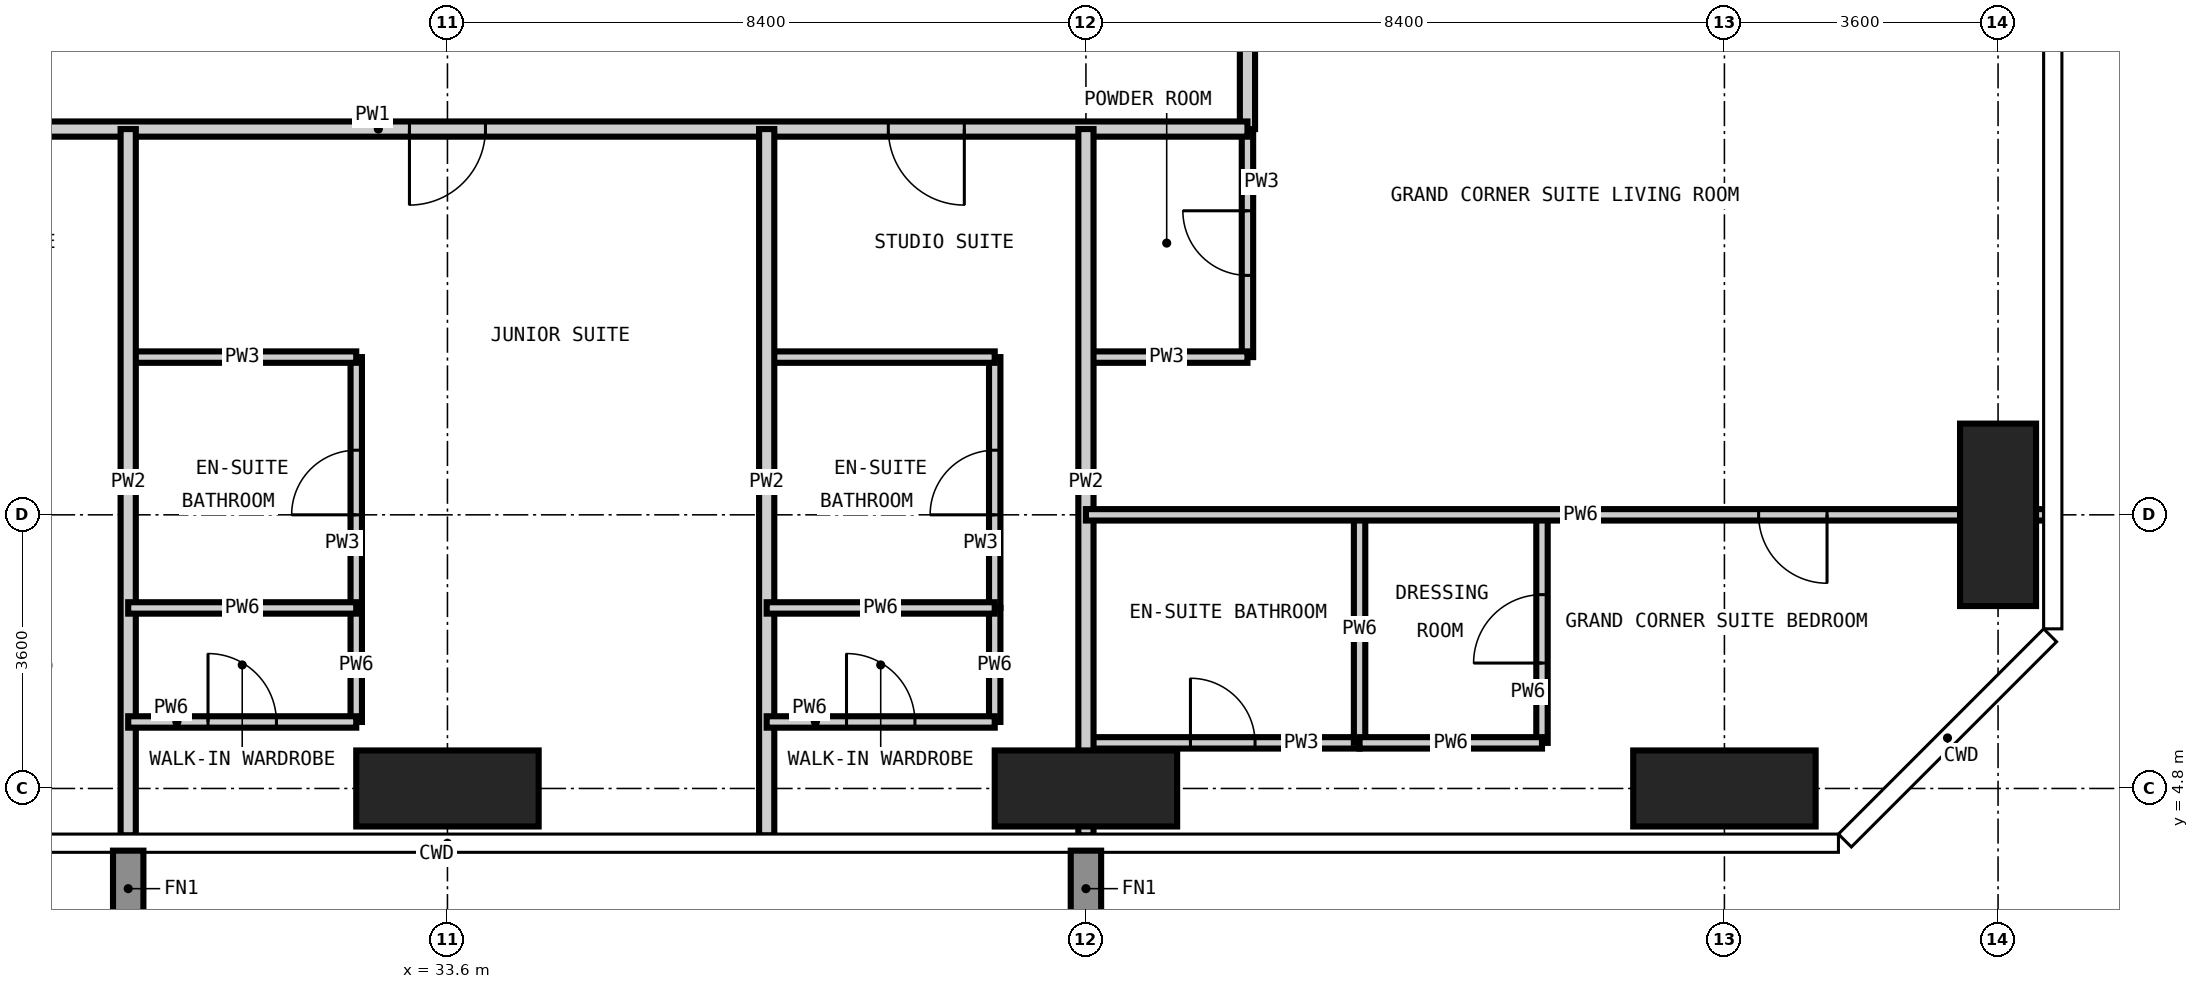
"""IFC4 building model, lengths in metres.
Left out: names, types, materials, properties, quantities, classifications, styles, units other than length and angle.
Written with IfcOpenShell. Run it as: python <this file> out.ifc"""

import sys

from ifc_helpers import new_model, si_unit, direction, frame, frame_2d, origin, origin_2d, place, context, subcontext, project, spatial, rectangle, extrude, element, fill, save


model = new_model("IFC4")
c1 = context("Model", 3, precision=1e-05, world=origin(), true_north=direction((0.0, 1.0)))
c2 = subcontext(c1, "Body", "Model", "MODEL_VIEW")
j1 = project(units=[si_unit("LENGTHUNIT", "METRE"), si_unit("PLANEANGLEUNIT", "RADIAN")], contexts=[c1])
p1 = place(None, origin())
s1 = spatial("IfcSite", under=j1, at=p1, CompositionType="ELEMENT")
p2 = place(p1, origin())
s2 = spatial("IfcBuilding", under=s1, at=p2, CompositionType="ELEMENT")
p3 = place(p2, frame((0.0, 0.0, 241.2)))
s3 = spatial("IfcBuildingStorey", under=s2, at=p3, CompositionType="ELEMENT", Elevation=241.2)
for number, where, z_axis, x_axis in (
    (1, (33.6, 4.8, -0.35), (0.0, 0.0, 1.0), (1.0, 0.0, 0.0)),
    (2, (42.0, 4.8, -0.35), (0.0, 0.0, 1.0), (1.0, 0.0, 0.0)),
    (3, (50.4, 4.8, -0.35), (0.0, 0.0, 1.0), (1.0, 0.0, 0.0)),
):
    element("IfcColumn", number, at=place(p3, frame(where, z_axis=z_axis, x_axis=x_axis)), inside=s3, PredefinedType="COLUMN", context=c2, shape_type="SweptSolid", body=[
        extrude(rectangle(XDim=2.4, YDim=1.0, at=origin_2d()), origin(), (0.0, 0.0, 1.0), 3.9),
    ])
p4 = place(p3, frame((54.0, 8.4, -0.35), z_axis=(0.0, 0.0, 1.0), x_axis=(1.0, 0.0, 0.0)))
e4 = element("IfcColumn", 4, at=p4, inside=s3, PredefinedType="COLUMN", context=c2, shape_type="SweptSolid", body=[
    extrude(rectangle(XDim=1.0, YDim=2.4, at=origin_2d()), origin(), (0.0, 0.0, 1.0), 3.9),
])
p5 = place(p3, frame((32.4, 7.175, 0.0), z_axis=(0.0, 0.0, 1.0), x_axis=(0.0, 1.0, 0.0)))
e5 = element("IfcWall", 5, at=p5, inside=s3, PredefinedType="PARTITIONING", context=c2, shape_type="SweptSolid", body=[
    extrude(rectangle(XDim=3.3, YDim=0.15, at=frame_2d((1.65, 0.0))), origin(), (0.0, 0.0, 1.0), 3.55),
])
p6 = place(p5, frame((1.225, 0.0, 0.0)))
e6 = element("IfcOpeningElement", 6, at=p6, cuts=e5, PredefinedType="OPENING", context=c2, shape_type="SweptSolid", body=[
    extrude(rectangle(XDim=0.85, YDim=2.1, at=frame_2d((0.425, 1.05))), frame((0.0, 0.085, 0.0), z_axis=(0.0, -1.0, 0.0), x_axis=(1.0, 0.0, 0.0)), (0.0, 0.0, 1.0), 0.17),
])
p7 = place(p3, frame((40.8, 7.175, 0.0), z_axis=(0.0, 0.0, 1.0), x_axis=(0.0, 1.0, 0.0)))
e7 = element("IfcWall", 7, at=p7, inside=s3, PredefinedType="PARTITIONING", context=c2, shape_type="SweptSolid", body=[
    extrude(rectangle(XDim=3.3, YDim=0.15, at=frame_2d((1.65, 0.0))), origin(), (0.0, 0.0, 1.0), 3.55),
])
p8 = place(p7, frame((1.225, 0.0, 0.0)))
e8 = element("IfcOpeningElement", 8, at=p8, cuts=e7, PredefinedType="OPENING", context=c2, shape_type="SweptSolid", body=[
    extrude(rectangle(XDim=0.85, YDim=2.1, at=frame_2d((0.425, 1.05))), frame((0.0, 0.085, 0.0), z_axis=(0.0, -1.0, 0.0), x_axis=(1.0, 0.0, 0.0)), (0.0, 0.0, 1.0), 0.17),
])
p9 = place(p3, frame((44.125, 10.475, 0.0), z_axis=(0.0, 0.0, 1.0), x_axis=(0.0, 1.0, 0.0)))
e9 = element("IfcWall", 9, at=p9, inside=s3, PredefinedType="PARTITIONING", context=c2, shape_type="SweptSolid", body=[
    extrude(rectangle(XDim=3.0, YDim=0.15, at=frame_2d((1.5, 0.0))), origin(), (0.0, 0.0, 1.0), 3.55),
])
p10 = place(p9, frame((1.075, 0.0, 0.0)))
e10 = element("IfcOpeningElement", 10, at=p10, cuts=e9, PredefinedType="OPENING", context=c2, shape_type="SweptSolid", body=[
    extrude(rectangle(XDim=0.85, YDim=2.1, at=frame_2d((0.425, 1.05))), frame((0.0, 0.085, 0.0), z_axis=(0.0, -1.0, 0.0), x_axis=(1.0, 0.0, 0.0)), (0.0, 0.0, 1.0), 0.17),
])
p11 = place(p3, frame((42.0, 5.4, 0.0), z_axis=(0.0, 0.0, 1.0), x_axis=(1.0, 0.0, 0.0)))
e11 = element("IfcWall", 11, at=p11, inside=s3, PredefinedType="PARTITIONING", context=c2, shape_type="SweptSolid", body=[
    extrude(rectangle(XDim=3.6, YDim=0.15, at=frame_2d((1.8, 0.0))), origin(), (0.0, 0.0, 1.0), 3.55),
])
p12 = place(p11, frame((1.375, 0.0, 0.0)))
e12 = element("IfcOpeningElement", 12, at=p12, cuts=e11, PredefinedType="OPENING", context=c2, shape_type="SweptSolid", body=[
    extrude(rectangle(XDim=0.85, YDim=2.1, at=frame_2d((0.425, 1.05))), frame((0.0, 0.085, 0.0), z_axis=(0.0, -1.0, 0.0), x_axis=(1.0, 0.0, 0.0)), (0.0, 0.0, 1.0), 0.17),
])
for number, where, z_axis, x_axis in (
    (13, (29.4, 10.475, 0.0), (0.0, 0.0, 1.0), (1.0, 0.0, 0.0)),
    (14, (37.8, 10.475, 0.0), (0.0, 0.0, 1.0), (1.0, 0.0, 0.0)),
):
    element("IfcWall", number, at=place(p3, frame(where, z_axis=z_axis, x_axis=x_axis)), inside=s3, PredefinedType="PARTITIONING", context=c2, shape_type="SweptSolid", body=[
        extrude(rectangle(XDim=3.0, YDim=0.15, at=frame_2d((1.5, 0.0))), origin(), (0.0, 0.0, 1.0), 3.55),
    ])
p13 = place(p3, frame((42.0, 10.475, 0.0), z_axis=(0.0, 0.0, 1.0), x_axis=(1.0, 0.0, 0.0)))
e15 = element("IfcWall", 15, at=p13, inside=s3, PredefinedType="PARTITIONING", context=c2, shape_type="SweptSolid", body=[
    extrude(rectangle(XDim=2.125, YDim=0.15, at=frame_2d((1.062, 0.0))), origin(), (0.0, 0.0, 1.0), 3.55),
])
p14 = place(p3, frame((44.125, 25.2, 0.0), z_axis=(0.0, 0.0, 1.0), x_axis=(0.0, -1.0, 0.0)))
e16 = element("IfcWall", 16, at=p14, inside=s3, PredefinedType="PARTITIONING", context=c2, shape_type="SweptSolid", body=[
    extrude(rectangle(XDim=11.725, YDim=0.2, at=frame_2d((5.862, 0.0))), origin(), (0.0, 0.0, 1.0), 3.55),
])
p15 = place(p14, frame((3.7, 0.0, 0.0)))
e17 = element("IfcOpeningElement", 17, at=p15, cuts=e16, PredefinedType="OPENING", context=c2, shape_type="SweptSolid", body=[
    extrude(rectangle(XDim=1.0, YDim=2.2, at=frame_2d((0.5, 1.1))), frame((0.0, 0.11, 0.0), z_axis=(0.0, -1.0, 0.0), x_axis=(1.0, 0.0, 0.0)), (0.0, 0.0, 1.0), 0.22),
])
p16 = place(p14, frame((9.563, 0.0, 0.0)))
e18 = element("IfcOpeningElement", 18, at=p16, cuts=e16, PredefinedType="OPENING", context=c2, shape_type="SweptSolid", body=[
    extrude(rectangle(XDim=1.0, YDim=2.2, at=frame_2d((0.5, 1.1))), frame((0.0, 0.11, 0.0), z_axis=(0.0, -1.0, 0.0), x_axis=(1.0, 0.0, 0.0)), (0.0, 0.0, 1.0), 0.22),
])
p17 = place(p3, frame((44.125, 13.475, 0.0), z_axis=(0.0, 0.0, 1.0), x_axis=(-1.0, 0.0, 0.0)))
e19 = element("IfcWall", 19, at=p17, inside=s3, PredefinedType="PARTITIONING", context=c2, shape_type="SweptSolid", body=[
    extrude(rectangle(XDim=22.25, YDim=0.2, at=frame_2d((11.125, 0.0))), origin(), (0.0, 0.0, 1.0), 3.55),
])
p18 = place(p17, frame((16.325, 0.0, 0.0)))
e20 = element("IfcOpeningElement", 20, at=p18, cuts=e19, PredefinedType="OPENING", context=c2, shape_type="SweptSolid", body=[
    extrude(rectangle(XDim=1.0, YDim=2.2, at=frame_2d((0.5, 1.1))), frame((0.0, 0.11, 0.0), z_axis=(0.0, -1.0, 0.0), x_axis=(1.0, 0.0, 0.0)), (0.0, 0.0, 1.0), 0.22),
])
p19 = place(p17, frame((10.025, 0.0, 0.0)))
e21 = element("IfcOpeningElement", 21, at=p19, cuts=e19, PredefinedType="OPENING", context=c2, shape_type="SweptSolid", body=[
    extrude(rectangle(XDim=1.0, YDim=2.2, at=frame_2d((0.5, 1.1))), frame((0.0, 0.11, 0.0), z_axis=(0.0, -1.0, 0.0), x_axis=(1.0, 0.0, 0.0)), (0.0, 0.0, 1.0), 0.22),
])
p20 = place(p17, frame((3.725, 0.0, 0.0)))
e22 = element("IfcOpeningElement", 22, at=p20, cuts=e19, PredefinedType="OPENING", context=c2, shape_type="SweptSolid", body=[
    extrude(rectangle(XDim=1.0, YDim=2.2, at=frame_2d((0.5, 1.1))), frame((0.0, 0.11, 0.0), z_axis=(0.0, -1.0, 0.0), x_axis=(1.0, 0.0, 0.0)), (0.0, 0.0, 1.0), 0.22),
])
for number, where, z_axis, x_axis in (
    (23, (29.4, 4.182, 0.0), (0.0, 0.0, 1.0), (0.0, 1.0, 0.0)),
    (24, (37.8, 4.182, 0.0), (0.0, 0.0, 1.0), (0.0, 1.0, 0.0)),
    (25, (42.0, 4.182, 0.0), (0.0, 0.0, 1.0), (0.0, 1.0, 0.0)),
):
    element("IfcWall", number, at=place(p3, frame(where, z_axis=z_axis, x_axis=x_axis)), inside=s3, PredefinedType="PARTITIONING", context=c2, shape_type="SweptSolid", body=[
        extrude(rectangle(XDim=9.293, YDim=0.2, at=frame_2d((4.646, 0.0))), origin(), (0.0, 0.0, 1.0), 3.55),
    ])
for number, where, z_axis, x_axis in (
    (26, (32.4, 5.675, 0.0), (0.0, 0.0, 1.0), (0.0, 1.0, 0.0)),
    (27, (40.8, 5.675, 0.0), (0.0, 0.0, 1.0), (0.0, 1.0, 0.0)),
):
    element("IfcWall", number, at=place(p3, frame(where, z_axis=z_axis, x_axis=x_axis)), inside=s3, PredefinedType="PARTITIONING", context=c2, shape_type="SweptSolid", body=[
        extrude(rectangle(XDim=1.5, YDim=0.15, at=frame_2d((0.75, 0.0))), origin(), (0.0, 0.0, 1.0), 3.55),
    ])
p21 = place(p3, frame((45.6, 5.4, 0.0), z_axis=(0.0, 0.0, 1.0), x_axis=(0.0, 1.0, 0.0)))
e28 = element("IfcWall", 28, at=p21, inside=s3, PredefinedType="PARTITIONING", context=c2, shape_type="SweptSolid", body=[
    extrude(rectangle(XDim=3.0, YDim=0.15, at=frame_2d((1.5, 0.0))), origin(), (0.0, 0.0, 1.0), 3.55),
])
p22 = place(p3, frame((48.0, 5.4, 0.0), z_axis=(0.0, 0.0, 1.0), x_axis=(0.0, 1.0, 0.0)))
e29 = element("IfcWall", 29, at=p22, inside=s3, PredefinedType="PARTITIONING", context=c2, shape_type="SweptSolid", body=[
    extrude(rectangle(XDim=3.0, YDim=0.15, at=frame_2d((1.5, 0.0))), origin(), (0.0, 0.0, 1.0), 3.55),
])
p23 = place(p22, frame((1.05, 0.0, 0.0)))
e30 = element("IfcOpeningElement", 30, at=p23, cuts=e29, PredefinedType="OPENING", context=c2, shape_type="SweptSolid", body=[
    extrude(rectangle(XDim=0.9, YDim=2.1, at=frame_2d((0.45, 1.05))), frame((0.0, 0.085, 0.0), z_axis=(0.0, -1.0, 0.0), x_axis=(1.0, 0.0, 0.0)), (0.0, 0.0, 1.0), 0.17),
])
p24 = place(p3, frame((45.6, 5.4, 0.0), z_axis=(0.0, 0.0, 1.0), x_axis=(1.0, 0.0, 0.0)))
e31 = element("IfcWall", 31, at=p24, inside=s3, PredefinedType="PARTITIONING", context=c2, shape_type="SweptSolid", body=[
    extrude(rectangle(XDim=2.4, YDim=0.15, at=frame_2d((1.2, 0.0))), origin(), (0.0, 0.0, 1.0), 3.55),
])
p25 = place(p3, frame((29.4, 5.675, 0.0), z_axis=(0.0, 0.0, 1.0), x_axis=(1.0, 0.0, 0.0)))
e32 = element("IfcWall", 32, at=p25, inside=s3, PredefinedType="PARTITIONING", context=c2, shape_type="SweptSolid", body=[
    extrude(rectangle(XDim=3.0, YDim=0.15, at=frame_2d((1.5, 0.0))), origin(), (0.0, 0.0, 1.0), 3.55),
])
p26 = place(p25, frame((1.05, 0.0, 0.0)))
e33 = element("IfcOpeningElement", 33, at=p26, cuts=e32, PredefinedType="OPENING", context=c2, shape_type="SweptSolid", body=[
    extrude(rectangle(XDim=0.9, YDim=2.1, at=frame_2d((0.45, 1.05))), frame((0.0, 0.085, 0.0), z_axis=(0.0, -1.0, 0.0), x_axis=(1.0, 0.0, 0.0)), (0.0, 0.0, 1.0), 0.17),
])
p27 = place(p3, frame((37.8, 5.675, 0.0), z_axis=(0.0, 0.0, 1.0), x_axis=(1.0, 0.0, 0.0)))
e34 = element("IfcWall", 34, at=p27, inside=s3, PredefinedType="PARTITIONING", context=c2, shape_type="SweptSolid", body=[
    extrude(rectangle(XDim=3.0, YDim=0.15, at=frame_2d((1.5, 0.0))), origin(), (0.0, 0.0, 1.0), 3.55),
])
p28 = place(p27, frame((1.05, 0.0, 0.0)))
e35 = element("IfcOpeningElement", 35, at=p28, cuts=e34, PredefinedType="OPENING", context=c2, shape_type="SweptSolid", body=[
    extrude(rectangle(XDim=0.9, YDim=2.1, at=frame_2d((0.45, 1.05))), frame((0.0, 0.085, 0.0), z_axis=(0.0, -1.0, 0.0), x_axis=(1.0, 0.0, 0.0)), (0.0, 0.0, 1.0), 0.17),
])
for number, where, z_axis, x_axis in (
    (36, (29.4, 7.175, 0.0), (0.0, 0.0, 1.0), (1.0, 0.0, 0.0)),
    (37, (37.8, 7.175, 0.0), (0.0, 0.0, 1.0), (1.0, 0.0, 0.0)),
):
    element("IfcWall", number, at=place(p3, frame(where, z_axis=z_axis, x_axis=x_axis)), inside=s3, PredefinedType="PARTITIONING", context=c2, shape_type="SweptSolid", body=[
        extrude(rectangle(XDim=3.0, YDim=0.15, at=frame_2d((1.5, 0.0))), origin(), (0.0, 0.0, 1.0), 3.55),
    ])
p29 = place(p3, frame((42.0, 8.4, 0.0), z_axis=(0.0, 0.0, 1.0), x_axis=(1.0, 0.0, 0.0)))
e38 = element("IfcWall", 38, at=p29, inside=s3, PredefinedType="PARTITIONING", context=c2, shape_type="SweptSolid", body=[
    extrude(rectangle(XDim=12.618, YDim=0.15, at=frame_2d((6.309, 0.0))), origin(), (0.0, 0.0, 1.0), 3.55),
])
p30 = place(p29, frame((8.85, 0.0, 0.0)))
e39 = element("IfcOpeningElement", 39, at=p30, cuts=e38, PredefinedType="OPENING", context=c2, shape_type="SweptSolid", body=[
    extrude(rectangle(XDim=0.9, YDim=2.1, at=frame_2d((0.45, 1.05))), frame((0.0, 0.085, 0.0), z_axis=(0.0, -1.0, 0.0), x_axis=(1.0, 0.0, 0.0)), (0.0, 0.0, 1.0), 0.17),
])
p31 = place(p19, origin())
e40 = element("IfcDoor", 40, at=p31, inside=s3, OperationType="SINGLE_SWING_RIGHT", PredefinedType="DOOR", context=c2, shape_type="SweptSolid", body=[
    extrude(rectangle(XDim=1.0, YDim=2.2, at=frame_2d((0.5, 1.1))), frame((0.0, 0.025, 0.0), z_axis=(0.0, -1.0, 0.0), x_axis=(1.0, 0.0, 0.0)), (0.0, 0.0, 1.0), 0.05),
])
fill(e21, e40)
p32 = place(p6, origin())
e41 = element("IfcDoor", 41, at=p32, inside=s3, OperationType="SINGLE_SWING_LEFT", PredefinedType="DOOR", context=c2, shape_type="SweptSolid", body=[
    extrude(rectangle(XDim=0.85, YDim=2.1, at=frame_2d((0.425, 1.05))), frame((0.0, 0.025, 0.0), z_axis=(0.0, -1.0, 0.0), x_axis=(1.0, 0.0, 0.0)), (0.0, 0.0, 1.0), 0.05),
])
fill(e6, e41)
p33 = place(p26, origin())
e42 = element("IfcDoor", 42, at=p33, inside=s3, OperationType="SINGLE_SWING_LEFT", PredefinedType="DOOR", context=c2, shape_type="SweptSolid", body=[
    extrude(rectangle(XDim=0.9, YDim=2.1, at=frame_2d((0.45, 1.05))), frame((0.0, 0.025, 0.0), z_axis=(0.0, -1.0, 0.0), x_axis=(1.0, 0.0, 0.0)), (0.0, 0.0, 1.0), 0.05),
])
fill(e33, e42)
p34 = place(p20, origin())
e43 = element("IfcDoor", 43, at=p34, inside=s3, OperationType="SINGLE_SWING_LEFT", PredefinedType="DOOR", context=c2, shape_type="SweptSolid", body=[
    extrude(rectangle(XDim=1.0, YDim=2.2, at=frame_2d((0.5, 1.1))), frame((0.0, 0.025, 0.0), z_axis=(0.0, -1.0, 0.0), x_axis=(1.0, 0.0, 0.0)), (0.0, 0.0, 1.0), 0.05),
])
fill(e22, e43)
p35 = place(p8, origin())
e44 = element("IfcDoor", 44, at=p35, inside=s3, OperationType="SINGLE_SWING_LEFT", PredefinedType="DOOR", context=c2, shape_type="SweptSolid", body=[
    extrude(rectangle(XDim=0.85, YDim=2.1, at=frame_2d((0.425, 1.05))), frame((0.0, 0.025, 0.0), z_axis=(0.0, -1.0, 0.0), x_axis=(1.0, 0.0, 0.0)), (0.0, 0.0, 1.0), 0.05),
])
fill(e8, e44)
p36 = place(p28, origin())
e45 = element("IfcDoor", 45, at=p36, inside=s3, OperationType="SINGLE_SWING_LEFT", PredefinedType="DOOR", context=c2, shape_type="SweptSolid", body=[
    extrude(rectangle(XDim=0.9, YDim=2.1, at=frame_2d((0.45, 1.05))), frame((0.0, 0.025, 0.0), z_axis=(0.0, -1.0, 0.0), x_axis=(1.0, 0.0, 0.0)), (0.0, 0.0, 1.0), 0.05),
])
fill(e35, e45)
p37 = place(p10, origin())
e46 = element("IfcDoor", 46, at=p37, inside=s3, OperationType="SINGLE_SWING_RIGHT", PredefinedType="DOOR", context=c2, shape_type="SweptSolid", body=[
    extrude(rectangle(XDim=0.85, YDim=2.1, at=frame_2d((0.425, 1.05))), frame((0.0, 0.025, 0.0), z_axis=(0.0, -1.0, 0.0), x_axis=(1.0, 0.0, 0.0)), (0.0, 0.0, 1.0), 0.05),
])
fill(e10, e46)
p38 = place(p30, frame((0.9, 0.0, 0.0), z_axis=(0.0, 0.0, 1.0), x_axis=(-1.0, 0.0, 0.0)))
e47 = element("IfcDoor", 47, at=p38, inside=s3, OperationType="SINGLE_SWING_LEFT", PredefinedType="DOOR", context=c2, shape_type="SweptSolid", body=[
    extrude(rectangle(XDim=0.9, YDim=2.1, at=frame_2d((0.45, 1.05))), frame((0.0, 0.025, 0.0), z_axis=(0.0, -1.0, 0.0), x_axis=(1.0, 0.0, 0.0)), (0.0, 0.0, 1.0), 0.05),
])
fill(e39, e47)
p39 = place(p12, origin())
e48 = element("IfcDoor", 48, at=p39, inside=s3, OperationType="SINGLE_SWING_LEFT", PredefinedType="DOOR", context=c2, shape_type="SweptSolid", body=[
    extrude(rectangle(XDim=0.85, YDim=2.1, at=frame_2d((0.425, 1.05))), frame((0.0, 0.025, 0.0), z_axis=(0.0, -1.0, 0.0), x_axis=(1.0, 0.0, 0.0)), (0.0, 0.0, 1.0), 0.05),
])
fill(e12, e48)
p40 = place(p23, origin())
e49 = element("IfcDoor", 49, at=p40, inside=s3, OperationType="SINGLE_SWING_LEFT", PredefinedType="DOOR", context=c2, shape_type="SweptSolid", body=[
    extrude(rectangle(XDim=0.9, YDim=2.1, at=frame_2d((0.45, 1.05))), frame((0.0, 0.025, 0.0), z_axis=(0.0, -1.0, 0.0), x_axis=(1.0, 0.0, 0.0)), (0.0, 0.0, 1.0), 0.05),
])
fill(e30, e49)
save(model, sys.argv[1])
